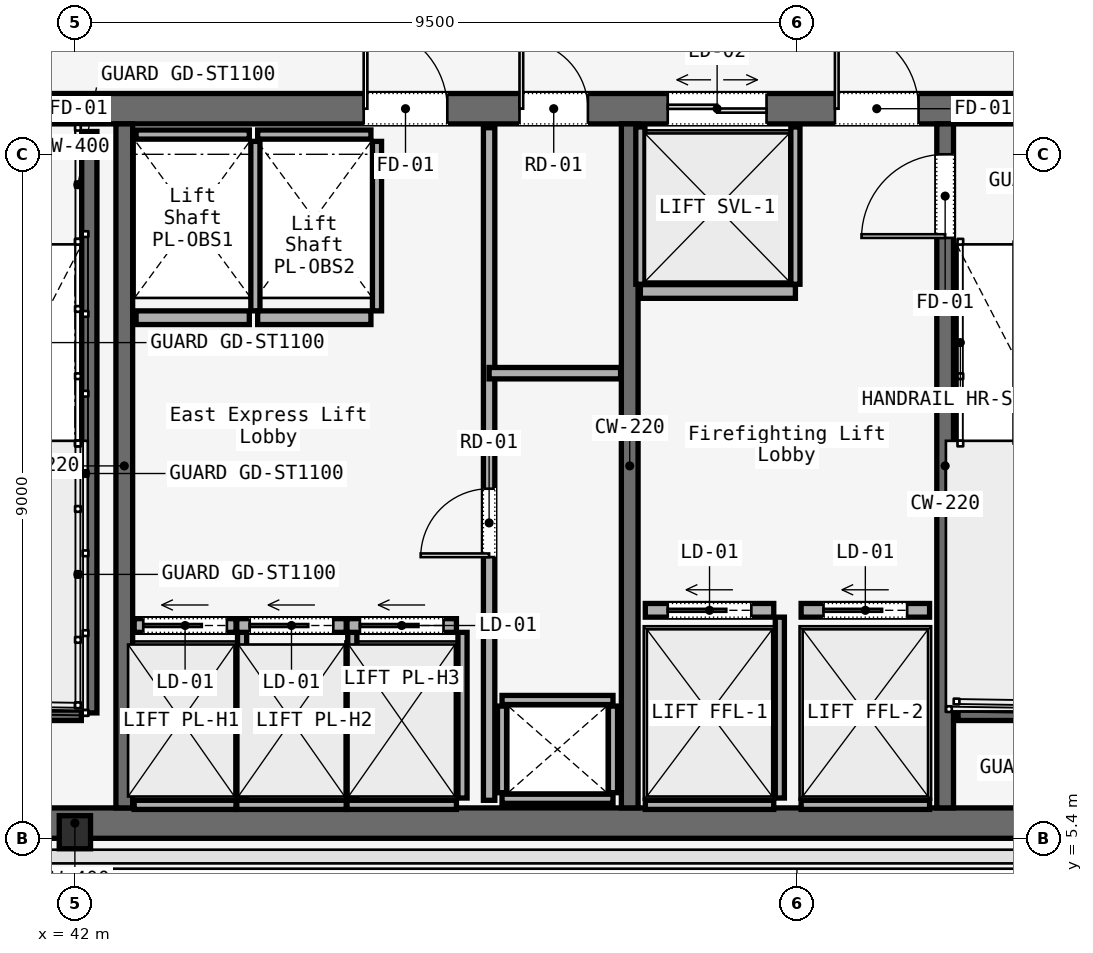
"""IFC4 building model, lengths in metres.
Left out: names, types, materials, properties, quantities, classifications, styles, units other than length and angle.
Written with IfcOpenShell. Run it as: python <this file> out.ifc"""

import sys

from ifc_helpers import new_model, si_unit, direction, frame, frame_2d, origin, origin_2d, place, context, subcontext, project, spatial, rectangle, i_section, extrude, element, fill, save


model = new_model("IFC4")
c1 = context("Model", 3, precision=1e-05, world=origin(), true_north=direction((0.0, 1.0)))
c2 = subcontext(c1, "Body", "Model", "MODEL_VIEW")
j1 = project(units=[si_unit("LENGTHUNIT", "METRE"), si_unit("PLANEANGLEUNIT", "RADIAN")], contexts=[c1])
p1 = place(None, origin())
s1 = spatial("IfcSite", under=j1, at=p1, CompositionType="ELEMENT")
p2 = place(p1, origin())
s2 = spatial("IfcBuilding", under=s1, at=p2, CompositionType="ELEMENT")
p3 = place(p2, frame((0.0, 0.0, 233.2)))
s3 = spatial("IfcBuildingStorey", under=s2, at=p3, CompositionType="ELEMENT", Elevation=233.2)
p4 = place(p3, frame((26.45, 15.0, 0.0), z_axis=(0.0, 0.0, 1.0), x_axis=(1.0, 0.0, 0.0)))
e1 = element("IfcWall", 1, at=p4, inside=s3, PredefinedType="SOLIDWALL", context=c2, shape_type="SweptSolid", body=[
    extrude(rectangle(XDim=31.1, YDim=0.4, at=frame_2d((15.55, 0.0))), origin(), (0.0, 0.0, 1.0), 3.58),
])
p5 = place(p4, frame((1.65, 0.0, 0.0)))
e2 = element("IfcOpeningElement", 2, at=p5, cuts=e1, PredefinedType="OPENING", context=c2, shape_type="SweptSolid", body=[
    extrude(rectangle(XDim=1.1, YDim=2.2, at=frame_2d((0.55, 1.1))), frame((0.0, 0.2, 0.0), z_axis=(0.0, -1.0, 0.0), x_axis=(1.0, 0.0, 0.0)), (0.0, 0.0, 1.0), 0.4),
])
p6 = place(p4, frame((13.65, 0.0, 0.0)))
e3 = element("IfcOpeningElement", 3, at=p6, cuts=e1, PredefinedType="OPENING", context=c2, shape_type="SweptSolid", body=[
    extrude(rectangle(XDim=1.1, YDim=2.2, at=frame_2d((0.55, 1.1))), frame((0.0, 0.2, 0.0), z_axis=(0.0, -1.0, 0.0), x_axis=(1.0, 0.0, 0.0)), (0.0, 0.0, 1.0), 0.4),
])
p7 = place(p4, frame((25.55, 0.0, 0.0)))
e4 = element("IfcOpeningElement", 4, at=p7, cuts=e1, PredefinedType="OPENING", context=c2, shape_type="SweptSolid", body=[
    extrude(rectangle(XDim=1.1, YDim=2.2, at=frame_2d((0.55, 1.1))), frame((0.0, 0.2, 0.0), z_axis=(0.0, -1.0, 0.0), x_axis=(1.0, 0.0, 0.0)), (0.0, 0.0, 1.0), 0.4),
])
p8 = place(p4, frame((19.35, 0.0, 0.0)))
e5 = element("IfcOpeningElement", 5, at=p8, cuts=e1, PredefinedType="OPENING", context=c2, shape_type="SweptSolid", body=[
    extrude(rectangle(XDim=1.1, YDim=2.2, at=frame_2d((0.55, 1.1))), frame((0.0, 0.2, 0.0), z_axis=(0.0, -1.0, 0.0), x_axis=(1.0, 0.0, 0.0)), (0.0, 0.0, 1.0), 0.4),
])
p9 = place(p4, frame((21.4, 0.0, 0.0)))
e6 = element("IfcOpeningElement", 6, at=p9, cuts=e1, PredefinedType="OPENING", context=c2, shape_type="SweptSolid", body=[
    extrude(rectangle(XDim=0.9, YDim=2.1, at=frame_2d((0.45, 1.05))), frame((0.0, 0.2, 0.0), z_axis=(0.0, -1.0, 0.0), x_axis=(1.0, 0.0, 0.0)), (0.0, 0.0, 1.0), 0.4),
])
p10 = place(p4, frame((5.14, 0.0, 0.0)))
e7 = element("IfcOpeningElement", 7, at=p10, cuts=e1, PredefinedType="OPENING", context=c2, shape_type="SweptSolid", body=[
    extrude(rectangle(XDim=0.95, YDim=2.2, at=frame_2d((0.475, 1.1))), frame((0.0, 0.2, 0.0), z_axis=(0.0, -1.0, 0.0), x_axis=(1.0, 0.0, 0.0)), (0.0, 0.0, 1.0), 0.4),
])
p11 = place(p4, frame((7.825, 0.0, 0.0)))
e8 = element("IfcOpeningElement", 8, at=p11, cuts=e1, PredefinedType="OPENING", context=c2, shape_type="SweptSolid", body=[
    extrude(rectangle(XDim=0.95, YDim=2.2, at=frame_2d((0.475, 1.1))), frame((0.0, 0.2, 0.0), z_axis=(0.0, -1.0, 0.0), x_axis=(1.0, 0.0, 0.0)), (0.0, 0.0, 1.0), 0.4),
])
p12 = place(p4, frame((10.46, 0.0, 0.0)))
e9 = element("IfcOpeningElement", 9, at=p12, cuts=e1, PredefinedType="OPENING", context=c2, shape_type="SweptSolid", body=[
    extrude(rectangle(XDim=0.95, YDim=2.2, at=frame_2d((0.475, 1.1))), frame((0.0, 0.2, 0.0), z_axis=(0.0, -1.0, 0.0), x_axis=(1.0, 0.0, 0.0)), (0.0, 0.0, 1.0), 0.4),
])
p13 = place(p4, frame((23.35, 0.0, 0.0)))
e10 = element("IfcOpeningElement", 10, at=p13, cuts=e1, PredefinedType="OPENING", context=c2, shape_type="SweptSolid", body=[
    extrude(rectangle(XDim=1.3, YDim=2.3, at=frame_2d((0.65, 1.15))), frame((0.0, 0.2, 0.0), z_axis=(0.0, -1.0, 0.0), x_axis=(1.0, 0.0, 0.0)), (0.0, 0.0, 1.0), 0.4),
])
p14 = place(p3, frame((26.45, 5.6, 0.0), z_axis=(0.0, 0.0, 1.0), x_axis=(1.0, 0.0, 0.0)))
e11 = element("IfcWall", 11, at=p14, inside=s3, PredefinedType="SOLIDWALL", context=c2, shape_type="SweptSolid", body=[
    extrude(rectangle(XDim=31.1, YDim=0.4, at=frame_2d((15.55, 0.0))), origin(), (0.0, 0.0, 1.0), 3.58),
])
for number, where, z_axis, x_axis in (
    (12, (42.65, 5.8, 0.0), (0.0, 0.0, 1.0), (0.0, 1.0, 0.0)),
    (13, (49.3, 5.8, 0.0), (0.0, 0.0, 1.0), (0.0, 1.0, 0.0)),
):
    element("IfcWall", number, at=place(p3, frame(where, z_axis=z_axis, x_axis=x_axis)), inside=s3, PredefinedType="SOLIDWALL", context=c2, shape_type="SweptSolid", body=[
        extrude(rectangle(XDim=9.0, YDim=0.22, at=frame_2d((4.5, 0.0))), origin(), (0.0, 0.0, 1.0), 3.58),
    ])
p15 = place(p3, frame((53.45, 5.8, 0.0), z_axis=(0.0, 0.0, 1.0), x_axis=(0.0, 1.0, 0.0)))
e14 = element("IfcWall", 14, at=p15, inside=s3, PredefinedType="SOLIDWALL", context=c2, shape_type="SweptSolid", body=[
    extrude(rectangle(XDim=9.0, YDim=0.22, at=frame_2d((4.5, 0.0))), origin(), (0.0, 0.0, 1.0), 3.58),
])
p16 = place(p15, frame((7.5, 0.0, 0.0)))
e15 = element("IfcOpeningElement", 15, at=p16, cuts=e14, PredefinedType="OPENING", context=c2, shape_type="SweptSolid", body=[
    extrude(rectangle(XDim=1.1, YDim=2.2, at=frame_2d((0.55, 1.1))), frame((0.0, 0.11, 0.0), z_axis=(0.0, -1.0, 0.0), x_axis=(1.0, 0.0, 0.0)), (0.0, 0.0, 1.0), 0.22),
])
p17 = place(p3, frame((42.0, 5.48, 0.0), z_axis=(0.0, 0.0, 1.0), x_axis=(1.0, 0.0, 0.0)))
e16 = element("IfcColumn", 16, at=p17, inside=s3, PredefinedType="COLUMN", context=c2, shape_type="SweptSolid", body=[
    extrude(i_section(OverallWidth=0.412, OverallDepth=0.435, WebThickness=0.036, FlangeThickness=0.044, FilletRadius=0.015, at=origin_2d()), origin(), (0.0, 0.0, 1.0), 3.58),
])
p18 = place(p3, frame((42.19, 14.7, 0.0), z_axis=(0.0, 0.0, 1.0), x_axis=(0.0, -1.0, 0.0)))
e17 = element("IfcWall", 17, at=p18, inside=s3, PredefinedType="SOLIDWALL", context=c2, shape_type="SweptSolid", body=[
    extrude(rectangle(XDim=7.65, YDim=0.2, at=frame_2d((3.825, 0.0))), origin(), (0.0, 0.0, 1.0), 3.8),
])
for number, where, z_axis, x_axis in (
    (18, (38.97, 7.05, 0.0), (0.0, 0.0, 1.0), (1.0, 0.0, 0.0)),
    (19, (53.62, 7.05, 0.0), (0.0, 0.0, 1.0), (1.0, 0.0, 0.0)),
):
    element("IfcWall", number, at=place(p3, frame(where, z_axis=z_axis, x_axis=x_axis)), inside=s3, PredefinedType="SOLIDWALL", context=c2, shape_type="SweptSolid", body=[
        extrude(rectangle(XDim=3.115, YDim=0.2, at=frame_2d((1.558, 0.0))), origin(), (0.0, 0.0, 1.0), 3.8),
    ])
for number, where, z_axis, x_axis in (
    (20, (47.62, 5.92, 0.0), (0.0, 0.0, 1.0), (1.0, 0.0, 0.0)),
    (21, (47.62, 7.22, 0.0), (0.0, 0.0, 1.0), (1.0, 0.0, 0.0)),
):
    element("IfcWall", number, at=place(p3, frame(where, z_axis=z_axis, x_axis=x_axis)), inside=s3, PredefinedType="SOLIDWALL", context=c2, shape_type="SweptSolid", body=[
        extrude(rectangle(XDim=1.46, YDim=0.12, at=frame_2d((0.73, 0.0))), origin(), (0.0, 0.0, 1.0), 3.01),
    ])
for number, where, z_axis, x_axis in (
    (22, (47.62, 6.0, 0.0), (0.0, 0.0, 1.0), (0.0, 1.0, 0.0)),
    (23, (49.08, 6.0, 0.0), (0.0, 0.0, 1.0), (0.0, 1.0, 0.0)),
):
    element("IfcWall", number, at=place(p3, frame(where, z_axis=z_axis, x_axis=x_axis)), inside=s3, PredefinedType="SOLIDWALL", context=c2, shape_type="SweptSolid", body=[
        extrude(rectangle(XDim=1.14, YDim=0.12, at=frame_2d((0.57, 0.0))), origin(), (0.0, 0.0, 1.0), 3.01),
    ])
p19 = place(p3, frame((47.45, 5.9, 0.0), z_axis=(0.0, 0.0, 1.0), x_axis=(0.0, 1.0, 0.0)))
e24 = element("IfcWall", 24, at=p19, inside=s3, PredefinedType="PARTITIONING", context=c2, shape_type="SweptSolid", body=[
    extrude(rectangle(XDim=8.85, YDim=0.15, at=frame_2d((4.425, 0.0))), origin(), (0.0, 0.0, 1.0), 3.01),
])
p20 = place(p19, frame((3.2, 0.0, 0.0)))
e25 = element("IfcOpeningElement", 25, at=p20, cuts=e24, PredefinedType="OPENING", context=c2, shape_type="SweptSolid", body=[
    extrude(rectangle(XDim=0.9, YDim=2.1, at=frame_2d((0.45, 1.05))), frame((0.0, 0.075, 0.0), z_axis=(0.0, -1.0, 0.0), x_axis=(1.0, 0.0, 0.0)), (0.0, 0.0, 1.0), 0.15),
])
p21 = place(p3, frame((47.45, 11.52, 0.0), z_axis=(0.0, 0.0, 1.0), x_axis=(1.0, 0.0, 0.0)))
e26 = element("IfcWall", 26, at=p21, inside=s3, PredefinedType="PARTITIONING", context=c2, shape_type="SweptSolid", body=[
    extrude(rectangle(XDim=1.73, YDim=0.15, at=frame_2d((0.865, 0.0))), origin(), (0.0, 0.0, 1.0), 3.01),
])
p22 = place(p3, frame((42.78, 8.2, 0.0), z_axis=(0.0, 0.0, 1.0), x_axis=(1.0, 0.0, 0.0)))
e27 = element("IfcWall", 27, at=p22, inside=s3, PredefinedType="SOLIDWALL", context=c2, shape_type="SweptSolid", body=[
    extrude(rectangle(XDim=1.34, YDim=0.18, at=frame_2d((0.67, 0.0))), origin(), (0.0, 0.0, 1.0), 3.01),
])
p23 = place(p22, frame((0.12, 0.0, 0.0)))
e28 = element("IfcOpeningElement", 28, at=p23, cuts=e27, PredefinedType="OPENING", context=c2, shape_type="SweptSolid", body=[
    extrude(rectangle(XDim=1.1, YDim=2.2, at=frame_2d((0.55, 1.1))), frame((0.0, 0.09, 0.0), z_axis=(0.0, -1.0, 0.0), x_axis=(1.0, 0.0, 0.0)), (0.0, 0.0, 1.0), 0.18),
])
p24 = place(p3, frame((42.78, 5.84, 0.0), z_axis=(0.0, 0.0, 1.0), x_axis=(1.0, 0.0, 0.0)))
e29 = element("IfcWall", 29, at=p24, inside=s3, PredefinedType="SOLIDWALL", context=c2, shape_type="SweptSolid", body=[
    extrude(rectangle(XDim=1.34, YDim=0.12, at=frame_2d((0.67, 0.0))), origin(), (0.0, 0.0, 1.0), 3.01),
])
p25 = place(p3, frame((44.2, 5.93, 0.0), z_axis=(0.0, 0.0, 1.0), x_axis=(0.0, 1.0, 0.0)))
e30 = element("IfcWall", 30, at=p25, inside=s3, PredefinedType="SOLIDWALL", context=c2, shape_type="SweptSolid", body=[
    extrude(rectangle(XDim=2.18, YDim=0.12, at=frame_2d((1.09, 0.0))), origin(), (0.0, 0.0, 1.0), 3.01),
])
p26 = place(p3, frame((44.13, 8.2, 0.0), z_axis=(0.0, 0.0, 1.0), x_axis=(1.0, 0.0, 0.0)))
e31 = element("IfcWall", 31, at=p26, inside=s3, PredefinedType="SOLIDWALL", context=c2, shape_type="SweptSolid", body=[
    extrude(rectangle(XDim=1.44, YDim=0.18, at=frame_2d((0.72, 0.0))), origin(), (0.0, 0.0, 1.0), 3.01),
])
p27 = place(p26, frame((0.17, 0.0, 0.0)))
e32 = element("IfcOpeningElement", 32, at=p27, cuts=e31, PredefinedType="OPENING", context=c2, shape_type="SweptSolid", body=[
    extrude(rectangle(XDim=1.1, YDim=2.2, at=frame_2d((0.55, 1.1))), frame((0.0, 0.09, 0.0), z_axis=(0.0, -1.0, 0.0), x_axis=(1.0, 0.0, 0.0)), (0.0, 0.0, 1.0), 0.18),
])
p28 = place(p3, frame((44.13, 5.84, 0.0), z_axis=(0.0, 0.0, 1.0), x_axis=(1.0, 0.0, 0.0)))
e33 = element("IfcWall", 33, at=p28, inside=s3, PredefinedType="SOLIDWALL", context=c2, shape_type="SweptSolid", body=[
    extrude(rectangle(XDim=1.44, YDim=0.12, at=frame_2d((0.72, 0.0))), origin(), (0.0, 0.0, 1.0), 3.01),
])
p29 = place(p3, frame((45.65, 5.93, 0.0), z_axis=(0.0, 0.0, 1.0), x_axis=(0.0, 1.0, 0.0)))
e34 = element("IfcWall", 34, at=p29, inside=s3, PredefinedType="SOLIDWALL", context=c2, shape_type="SweptSolid", body=[
    extrude(rectangle(XDim=2.18, YDim=0.12, at=frame_2d((1.09, 0.0))), origin(), (0.0, 0.0, 1.0), 3.01),
])
p30 = place(p3, frame((45.58, 8.2, 0.0), z_axis=(0.0, 0.0, 1.0), x_axis=(1.0, 0.0, 0.0)))
e35 = element("IfcWall", 35, at=p30, inside=s3, PredefinedType="SOLIDWALL", context=c2, shape_type="SweptSolid", body=[
    extrude(rectangle(XDim=1.44, YDim=0.18, at=frame_2d((0.72, 0.0))), origin(), (0.0, 0.0, 1.0), 3.01),
])
p31 = place(p30, frame((0.17, 0.0, 0.0)))
e36 = element("IfcOpeningElement", 36, at=p31, cuts=e35, PredefinedType="OPENING", context=c2, shape_type="SweptSolid", body=[
    extrude(rectangle(XDim=1.1, YDim=2.2, at=frame_2d((0.55, 1.1))), frame((0.0, 0.09, 0.0), z_axis=(0.0, -1.0, 0.0), x_axis=(1.0, 0.0, 0.0)), (0.0, 0.0, 1.0), 0.18),
])
p32 = place(p3, frame((45.58, 5.84, 0.0), z_axis=(0.0, 0.0, 1.0), x_axis=(1.0, 0.0, 0.0)))
e37 = element("IfcWall", 37, at=p32, inside=s3, PredefinedType="SOLIDWALL", context=c2, shape_type="SweptSolid", body=[
    extrude(rectangle(XDim=1.44, YDim=0.12, at=frame_2d((0.72, 0.0))), origin(), (0.0, 0.0, 1.0), 3.01),
])
p33 = place(p3, frame((47.1, 5.93, 0.0), z_axis=(0.0, 0.0, 1.0), x_axis=(0.0, 1.0, 0.0)))
e38 = element("IfcWall", 38, at=p33, inside=s3, PredefinedType="SOLIDWALL", context=c2, shape_type="SweptSolid", body=[
    extrude(rectangle(XDim=2.18, YDim=0.12, at=frame_2d((1.09, 0.0))), origin(), (0.0, 0.0, 1.0), 3.01),
])
p34 = place(p3, frame((42.805, 12.25, 0.0), z_axis=(0.0, 0.0, 1.0), x_axis=(1.0, 0.0, 0.0)))
e39 = element("IfcWall", 39, at=p34, inside=s3, PredefinedType="SOLIDWALL", context=c2, shape_type="SweptSolid", body=[
    extrude(rectangle(XDim=1.49, YDim=0.18, at=frame_2d((0.745, 0.0))), origin(), (0.0, 0.0, 1.0), 3.01),
])
p35 = place(p3, frame((42.805, 14.66, 0.0), z_axis=(0.0, 0.0, 1.0), x_axis=(1.0, 0.0, 0.0)))
e40 = element("IfcWall", 40, at=p35, inside=s3, PredefinedType="SOLIDWALL", context=c2, shape_type="SweptSolid", body=[
    extrude(rectangle(XDim=1.49, YDim=0.12, at=frame_2d((0.745, 0.0))), origin(), (0.0, 0.0, 1.0), 3.01),
])
p36 = place(p3, frame((44.375, 12.34, 0.0), z_axis=(0.0, 0.0, 1.0), x_axis=(0.0, 1.0, 0.0)))
e41 = element("IfcWall", 41, at=p36, inside=s3, PredefinedType="SOLIDWALL", context=c2, shape_type="SweptSolid", body=[
    extrude(rectangle(XDim=2.23, YDim=0.12, at=frame_2d((1.115, 0.0))), origin(), (0.0, 0.0, 1.0), 3.01),
])
p37 = place(p3, frame((44.405, 12.25, 0.0), z_axis=(0.0, 0.0, 1.0), x_axis=(1.0, 0.0, 0.0)))
e42 = element("IfcWall", 42, at=p37, inside=s3, PredefinedType="SOLIDWALL", context=c2, shape_type="SweptSolid", body=[
    extrude(rectangle(XDim=1.49, YDim=0.18, at=frame_2d((0.745, 0.0))), origin(), (0.0, 0.0, 1.0), 3.01),
])
p38 = place(p3, frame((44.405, 14.66, 0.0), z_axis=(0.0, 0.0, 1.0), x_axis=(1.0, 0.0, 0.0)))
e43 = element("IfcWall", 43, at=p38, inside=s3, PredefinedType="SOLIDWALL", context=c2, shape_type="SweptSolid", body=[
    extrude(rectangle(XDim=1.49, YDim=0.12, at=frame_2d((0.745, 0.0))), origin(), (0.0, 0.0, 1.0), 3.01),
])
p39 = place(p3, frame((45.975, 12.34, 0.0), z_axis=(0.0, 0.0, 1.0), x_axis=(0.0, 1.0, 0.0)))
e44 = element("IfcWall", 44, at=p39, inside=s3, PredefinedType="SOLIDWALL", context=c2, shape_type="SweptSolid", body=[
    extrude(rectangle(XDim=2.23, YDim=0.12, at=frame_2d((1.115, 0.0))), origin(), (0.0, 0.0, 1.0), 3.01),
])
p40 = place(p3, frame((49.505, 8.4, 0.0), z_axis=(0.0, 0.0, 1.0), x_axis=(1.0, 0.0, 0.0)))
e45 = element("IfcWall", 45, at=p40, inside=s3, PredefinedType="SOLIDWALL", context=c2, shape_type="SweptSolid", body=[
    extrude(rectangle(XDim=1.69, YDim=0.18, at=frame_2d((0.845, 0.0))), origin(), (0.0, 0.0, 1.0), 3.01),
])
p41 = place(p40, frame((0.295, 0.0, 0.0)))
e46 = element("IfcOpeningElement", 46, at=p41, cuts=e45, PredefinedType="OPENING", context=c2, shape_type="SweptSolid", body=[
    extrude(rectangle(XDim=1.1, YDim=2.2, at=frame_2d((0.55, 1.1))), frame((0.0, 0.09, 0.0), z_axis=(0.0, -1.0, 0.0), x_axis=(1.0, 0.0, 0.0)), (0.0, 0.0, 1.0), 0.18),
])
p42 = place(p3, frame((49.505, 5.84, 0.0), z_axis=(0.0, 0.0, 1.0), x_axis=(1.0, 0.0, 0.0)))
e47 = element("IfcWall", 47, at=p42, inside=s3, PredefinedType="SOLIDWALL", context=c2, shape_type="SweptSolid", body=[
    extrude(rectangle(XDim=1.69, YDim=0.12, at=frame_2d((0.845, 0.0))), origin(), (0.0, 0.0, 1.0), 3.01),
])
p43 = place(p3, frame((51.275, 5.93, 0.0), z_axis=(0.0, 0.0, 1.0), x_axis=(0.0, 1.0, 0.0)))
e48 = element("IfcWall", 48, at=p43, inside=s3, PredefinedType="SOLIDWALL", context=c2, shape_type="SweptSolid", body=[
    extrude(rectangle(XDim=2.38, YDim=0.12, at=frame_2d((1.19, 0.0))), origin(), (0.0, 0.0, 1.0), 3.01),
])
p44 = place(p3, frame((51.555, 8.4, 0.0), z_axis=(0.0, 0.0, 1.0), x_axis=(1.0, 0.0, 0.0)))
e49 = element("IfcWall", 49, at=p44, inside=s3, PredefinedType="SOLIDWALL", context=c2, shape_type="SweptSolid", body=[
    extrude(rectangle(XDim=1.69, YDim=0.18, at=frame_2d((0.845, 0.0))), origin(), (0.0, 0.0, 1.0), 3.01),
])
p45 = place(p44, frame((0.295, 0.0, 0.0)))
e50 = element("IfcOpeningElement", 50, at=p45, cuts=e49, PredefinedType="OPENING", context=c2, shape_type="SweptSolid", body=[
    extrude(rectangle(XDim=1.1, YDim=2.2, at=frame_2d((0.55, 1.1))), frame((0.0, 0.09, 0.0), z_axis=(0.0, -1.0, 0.0), x_axis=(1.0, 0.0, 0.0)), (0.0, 0.0, 1.0), 0.18),
])
p46 = place(p3, frame((51.555, 5.84, 0.0), z_axis=(0.0, 0.0, 1.0), x_axis=(1.0, 0.0, 0.0)))
e51 = element("IfcWall", 51, at=p46, inside=s3, PredefinedType="SOLIDWALL", context=c2, shape_type="SweptSolid", body=[
    extrude(rectangle(XDim=1.69, YDim=0.12, at=frame_2d((0.845, 0.0))), origin(), (0.0, 0.0, 1.0), 3.01),
])
p47 = place(p3, frame((49.44, 12.595, 0.0), z_axis=(0.0, 0.0, 1.0), x_axis=(1.0, 0.0, 0.0)))
e52 = element("IfcWall", 52, at=p47, inside=s3, PredefinedType="SOLIDWALL", context=c2, shape_type="SweptSolid", body=[
    extrude(rectangle(XDim=2.04, YDim=0.18, at=frame_2d((1.02, 0.0))), origin(), (0.0, 0.0, 1.0), 3.01),
])
for number, where, z_axis, x_axis in (
    (53, (49.44, 12.69, 0.0), (0.0, 0.0, 1.0), (0.0, 1.0, 0.0)),
    (54, (51.48, 12.69, 0.0), (0.0, 0.0, 1.0), (0.0, 1.0, 0.0)),
):
    element("IfcWall", number, at=place(p3, frame(where, z_axis=z_axis, x_axis=x_axis)), inside=s3, PredefinedType="SOLIDWALL", context=c2, shape_type="SweptSolid", body=[
        extrude(rectangle(XDim=2.07, YDim=0.12, at=frame_2d((1.035, 0.0))), origin(), (0.0, 0.0, 1.0), 3.01),
    ])
p48 = place(p7, origin())
e55 = element("IfcDoor", 55, at=p48, inside=s3, OperationType="SINGLE_SWING_RIGHT", PredefinedType="DOOR", context=c2, shape_type="SweptSolid", body=[
    extrude(rectangle(XDim=1.1, YDim=2.2, at=frame_2d((0.55, 1.1))), frame((0.0, 0.025, 0.0), z_axis=(0.0, -1.0, 0.0), x_axis=(1.0, 0.0, 0.0)), (0.0, 0.0, 1.0), 0.05),
])
fill(e4, e55)
p49 = place(p8, origin())
e56 = element("IfcDoor", 56, at=p49, inside=s3, OperationType="SINGLE_SWING_LEFT", PredefinedType="DOOR", context=c2, shape_type="SweptSolid", body=[
    extrude(rectangle(XDim=1.1, YDim=2.2, at=frame_2d((0.55, 1.1))), frame((0.0, 0.025, 0.0), z_axis=(0.0, -1.0, 0.0), x_axis=(1.0, 0.0, 0.0)), (0.0, 0.0, 1.0), 0.05),
])
fill(e5, e56)
p50 = place(p9, origin())
e57 = element("IfcDoor", 57, at=p50, inside=s3, OperationType="SINGLE_SWING_LEFT", PredefinedType="DOOR", context=c2, shape_type="SweptSolid", body=[
    extrude(rectangle(XDim=0.9, YDim=2.1, at=frame_2d((0.45, 1.05))), frame((0.0, 0.025, 0.0), z_axis=(0.0, -1.0, 0.0), x_axis=(1.0, 0.0, 0.0)), (0.0, 0.0, 1.0), 0.05),
])
fill(e6, e57)
p51 = place(p16, origin())
e58 = element("IfcDoor", 58, at=p51, inside=s3, OperationType="SINGLE_SWING_LEFT", PredefinedType="DOOR", context=c2, shape_type="SweptSolid", body=[
    extrude(rectangle(XDim=1.1, YDim=2.2, at=frame_2d((0.55, 1.1))), frame((0.0, 0.025, 0.0), z_axis=(0.0, -1.0, 0.0), x_axis=(1.0, 0.0, 0.0)), (0.0, 0.0, 1.0), 0.05),
])
fill(e15, e58)
p52 = place(p20, origin())
e59 = element("IfcDoor", 59, at=p52, inside=s3, OperationType="SINGLE_SWING_LEFT", PredefinedType="DOOR", context=c2, shape_type="SweptSolid", body=[
    extrude(rectangle(XDim=0.9, YDim=2.1, at=frame_2d((0.45, 1.05))), frame((0.0, 0.025, 0.0), z_axis=(0.0, -1.0, 0.0), x_axis=(1.0, 0.0, 0.0)), (0.0, 0.0, 1.0), 0.05),
])
fill(e25, e59)
p53 = place(p23, origin())
e60 = element("IfcDoor", 60, at=p53, inside=s3, OperationType="SLIDING_TO_LEFT", PredefinedType="DOOR", context=c2, shape_type="SweptSolid", body=[
    extrude(rectangle(XDim=1.1, YDim=2.2, at=frame_2d((0.55, 1.1))), frame((0.0, 0.025, 0.0), z_axis=(0.0, -1.0, 0.0), x_axis=(1.0, 0.0, 0.0)), (0.0, 0.0, 1.0), 0.05),
])
fill(e28, e60)
p54 = place(p27, origin())
e61 = element("IfcDoor", 61, at=p54, inside=s3, OperationType="SLIDING_TO_LEFT", PredefinedType="DOOR", context=c2, shape_type="SweptSolid", body=[
    extrude(rectangle(XDim=1.1, YDim=2.2, at=frame_2d((0.55, 1.1))), frame((0.0, 0.025, 0.0), z_axis=(0.0, -1.0, 0.0), x_axis=(1.0, 0.0, 0.0)), (0.0, 0.0, 1.0), 0.05),
])
fill(e32, e61)
p55 = place(p31, origin())
e62 = element("IfcDoor", 62, at=p55, inside=s3, OperationType="SLIDING_TO_LEFT", PredefinedType="DOOR", context=c2, shape_type="SweptSolid", body=[
    extrude(rectangle(XDim=1.1, YDim=2.2, at=frame_2d((0.55, 1.1))), frame((0.0, 0.025, 0.0), z_axis=(0.0, -1.0, 0.0), x_axis=(1.0, 0.0, 0.0)), (0.0, 0.0, 1.0), 0.05),
])
fill(e36, e62)
p56 = place(p41, origin())
e63 = element("IfcDoor", 63, at=p56, inside=s3, OperationType="SLIDING_TO_LEFT", PredefinedType="DOOR", context=c2, shape_type="SweptSolid", body=[
    extrude(rectangle(XDim=1.1, YDim=2.2, at=frame_2d((0.55, 1.1))), frame((0.0, 0.025, 0.0), z_axis=(0.0, -1.0, 0.0), x_axis=(1.0, 0.0, 0.0)), (0.0, 0.0, 1.0), 0.05),
])
fill(e46, e63)
p57 = place(p45, origin())
e64 = element("IfcDoor", 64, at=p57, inside=s3, OperationType="SLIDING_TO_LEFT", PredefinedType="DOOR", context=c2, shape_type="SweptSolid", body=[
    extrude(rectangle(XDim=1.1, YDim=2.2, at=frame_2d((0.55, 1.1))), frame((0.0, 0.025, 0.0), z_axis=(0.0, -1.0, 0.0), x_axis=(1.0, 0.0, 0.0)), (0.0, 0.0, 1.0), 0.05),
])
fill(e50, e64)
p58 = place(p13, origin())
e65 = element("IfcDoor", 65, at=p58, inside=s3, OperationType="DOUBLE_DOOR_SLIDING", PredefinedType="DOOR", context=c2, shape_type="SweptSolid", body=[
    extrude(rectangle(XDim=1.3, YDim=2.3, at=frame_2d((0.65, 1.15))), frame((0.0, 0.025, 0.0), z_axis=(0.0, -1.0, 0.0), x_axis=(1.0, 0.0, 0.0)), (0.0, 0.0, 1.0), 0.05),
])
fill(e10, e65)
save(model, sys.argv[1])
